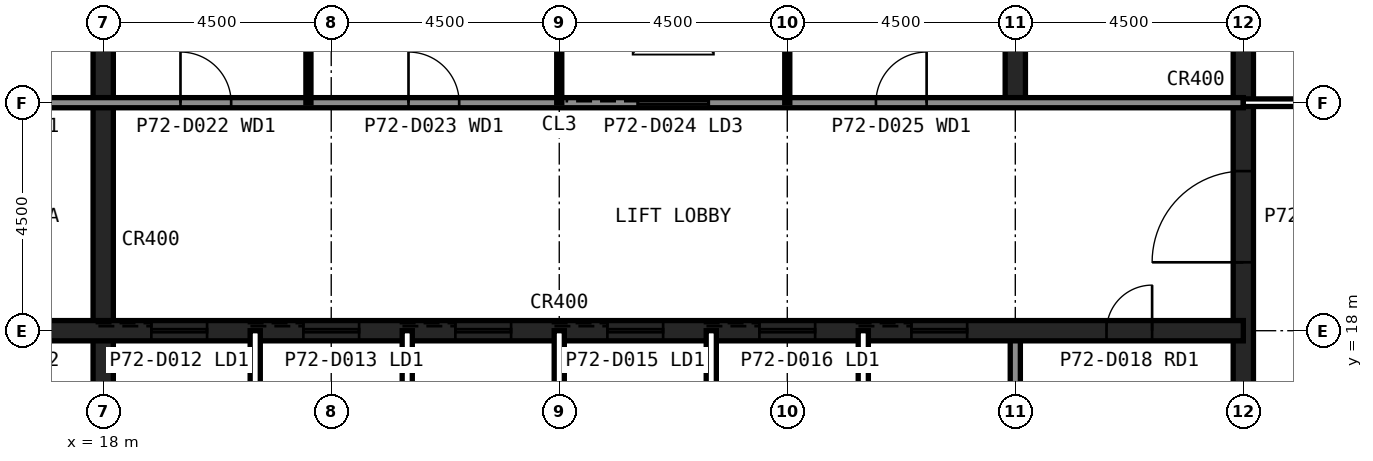
"""IFC4 building model, lengths in metres.
Left out: names, types, materials, properties, quantities, classifications, styles, units other than length and angle.
Written with IfcOpenShell. Run it as: python <this file> out.ifc"""

import sys

from ifc_helpers import new_model, si_unit, direction, frame, frame_2d, origin, place, context, subcontext, project, spatial, rectangle, extrude, element, fill, save


model = new_model("IFC4")
c1 = context("Model", 3, precision=1e-05, world=origin(), true_north=direction((0.0, 1.0)))
c2 = subcontext(c1, "Body", "Model", "MODEL_VIEW")
j1 = project(units=[si_unit("LENGTHUNIT", "METRE"), si_unit("PLANEANGLEUNIT", "RADIAN")], contexts=[c1])
p1 = place(None, origin())
s1 = spatial("IfcSite", under=j1, at=p1, CompositionType="ELEMENT")
p2 = place(p1, origin())
s2 = spatial("IfcBuilding", under=s1, at=p2, CompositionType="ELEMENT")
p3 = place(p2, frame((0.0, 0.0, 302.6)))
s3 = spatial("IfcBuildingStorey", under=s2, at=p3, CompositionType="ELEMENT", Elevation=302.6)
p4 = place(p3, frame((40.5, 13.5, 0.0), z_axis=(0.0, 0.0, 1.0), x_axis=(0.0, 1.0, 0.0)))
e1 = element("IfcWall", 1, at=p4, inside=s3, PredefinedType="SHEAR", context=c2, shape_type="SweptSolid", body=[
    extrude(rectangle(XDim=27.0, YDim=0.4, at=frame_2d((13.5, 0.0))), origin(), (0.0, 0.0, 1.0), 4.0),
])
p5 = place(p4, frame((5.85, 0.0, 0.0)))
e2 = element("IfcOpeningElement", 2, at=p5, cuts=e1, PredefinedType="OPENING", context=c2, shape_type="SweptSolid", body=[
    extrude(rectangle(XDim=1.8, YDim=2.1, at=frame_2d((0.9, 1.05))), frame((0.0, 0.21, 0.0), z_axis=(0.0, -1.0, 0.0), x_axis=(1.0, 0.0, 0.0)), (0.0, 0.0, 1.0), 0.42),
])
p6 = place(p4, frame((19.65, 0.0, 0.0)))
e3 = element("IfcOpeningElement", 3, at=p6, cuts=e1, PredefinedType="OPENING", context=c2, shape_type="SweptSolid", body=[
    extrude(rectangle(XDim=1.2, YDim=2.1, at=frame_2d((0.6, 1.05))), frame((0.0, 0.21, 0.0), z_axis=(0.0, -1.0, 0.0), x_axis=(1.0, 0.0, 0.0)), (0.0, 0.0, 1.0), 0.42),
])
p7 = place(p3, frame((18.0, 13.5, 0.0), z_axis=(0.0, 0.0, 1.0), x_axis=(0.0, 1.0, 0.0)))
e4 = element("IfcWall", 4, at=p7, inside=s3, PredefinedType="SHEAR", context=c2, shape_type="SweptSolid", body=[
    extrude(rectangle(XDim=18.0, YDim=0.4, at=frame_2d((9.0, 0.0))), origin(), (0.0, 0.0, 1.0), 4.0),
])
p8 = place(p3, frame((36.0, 13.5, 0.0), z_axis=(0.0, 0.0, 1.0), x_axis=(0.0, 1.0, 0.0)))
e5 = element("IfcWall", 5, at=p8, inside=s3, PredefinedType="SOLIDWALL", context=c2, shape_type="SweptSolid", body=[
    extrude(rectangle(XDim=4.5, YDim=0.2, at=frame_2d((2.25, 0.0))), origin(), (0.0, 0.0, 1.0), 3.84),
])
p9 = place(p3, frame((36.0, 22.5, 0.0), z_axis=(0.0, 0.0, 1.0), x_axis=(0.0, 1.0, 0.0)))
e6 = element("IfcWall", 6, at=p9, inside=s3, PredefinedType="SHEAR", context=c2, shape_type="SweptSolid", body=[
    extrude(rectangle(XDim=18.0, YDim=0.4, at=frame_2d((9.0, 0.0))), origin(), (0.0, 0.0, 1.0), 4.0),
])
p10 = place(p3, frame((13.5, 18.0, 0.0), z_axis=(0.0, 0.0, 1.0), x_axis=(1.0, 0.0, 0.0)))
e7 = element("IfcWall", 7, at=p10, inside=s3, PredefinedType="SHEAR", context=c2, shape_type="SweptSolid", body=[
    extrude(rectangle(XDim=27.0, YDim=0.4, at=frame_2d((13.5, 0.0))), origin(), (0.0, 0.0, 1.0), 4.0),
])
p11 = place(p10, frame((24.3, 0.0, 0.0)))
e8 = element("IfcOpeningElement", 8, at=p11, cuts=e7, PredefinedType="OPENING", context=c2, shape_type="SweptSolid", body=[
    extrude(rectangle(XDim=0.9, YDim=2.1, at=frame_2d((0.45, 1.05))), frame((0.0, 0.21, 0.0), z_axis=(0.0, -1.0, 0.0), x_axis=(1.0, 0.0, 0.0)), (0.0, 0.0, 1.0), 0.42),
])
p12 = place(p10, frame((5.45, 0.0, 0.0)))
e9 = element("IfcOpeningElement", 9, at=p12, cuts=e7, PredefinedType="OPENING", context=c2, shape_type="SweptSolid", body=[
    extrude(rectangle(XDim=1.1, YDim=2.1, at=frame_2d((0.55, 1.05))), frame((0.0, 0.21, 0.0), z_axis=(0.0, -1.0, 0.0), x_axis=(1.0, 0.0, 0.0)), (0.0, 0.0, 1.0), 0.42),
])
p13 = place(p10, frame((8.45, 0.0, 0.0)))
e10 = element("IfcOpeningElement", 10, at=p13, cuts=e7, PredefinedType="OPENING", context=c2, shape_type="SweptSolid", body=[
    extrude(rectangle(XDim=1.1, YDim=2.1, at=frame_2d((0.55, 1.05))), frame((0.0, 0.21, 0.0), z_axis=(0.0, -1.0, 0.0), x_axis=(1.0, 0.0, 0.0)), (0.0, 0.0, 1.0), 0.42),
])
p14 = place(p10, frame((11.45, 0.0, 0.0)))
e11 = element("IfcOpeningElement", 11, at=p14, cuts=e7, PredefinedType="OPENING", context=c2, shape_type="SweptSolid", body=[
    extrude(rectangle(XDim=1.1, YDim=2.1, at=frame_2d((0.55, 1.05))), frame((0.0, 0.21, 0.0), z_axis=(0.0, -1.0, 0.0), x_axis=(1.0, 0.0, 0.0)), (0.0, 0.0, 1.0), 0.42),
])
p15 = place(p10, frame((14.45, 0.0, 0.0)))
e12 = element("IfcOpeningElement", 12, at=p15, cuts=e7, PredefinedType="OPENING", context=c2, shape_type="SweptSolid", body=[
    extrude(rectangle(XDim=1.1, YDim=2.1, at=frame_2d((0.55, 1.05))), frame((0.0, 0.21, 0.0), z_axis=(0.0, -1.0, 0.0), x_axis=(1.0, 0.0, 0.0)), (0.0, 0.0, 1.0), 0.42),
])
p16 = place(p10, frame((17.45, 0.0, 0.0)))
e13 = element("IfcOpeningElement", 13, at=p16, cuts=e7, PredefinedType="OPENING", context=c2, shape_type="SweptSolid", body=[
    extrude(rectangle(XDim=1.1, YDim=2.1, at=frame_2d((0.55, 1.05))), frame((0.0, 0.21, 0.0), z_axis=(0.0, -1.0, 0.0), x_axis=(1.0, 0.0, 0.0)), (0.0, 0.0, 1.0), 0.42),
])
p17 = place(p10, frame((20.45, 0.0, 0.0)))
e14 = element("IfcOpeningElement", 14, at=p17, cuts=e7, PredefinedType="OPENING", context=c2, shape_type="SweptSolid", body=[
    extrude(rectangle(XDim=1.1, YDim=2.1, at=frame_2d((0.55, 1.05))), frame((0.0, 0.21, 0.0), z_axis=(0.0, -1.0, 0.0), x_axis=(1.0, 0.0, 0.0)), (0.0, 0.0, 1.0), 0.42),
])
p18 = place(p10, frame((1.6, 0.0, 0.0)))
e15 = element("IfcOpeningElement", 15, at=p18, cuts=e7, PredefinedType="OPENING", context=c2, shape_type="SweptSolid", body=[
    extrude(rectangle(XDim=1.3, YDim=2.2, at=frame_2d((0.65, 1.1))), frame((0.0, 0.21, 0.0), z_axis=(0.0, -1.0, 0.0), x_axis=(1.0, 0.0, 0.0)), (0.0, 0.0, 1.0), 0.42),
])
p19 = place(p3, frame((13.5, 22.5, 0.0), z_axis=(0.0, 0.0, 1.0), x_axis=(1.0, 0.0, 0.0)))
e16 = element("IfcWall", 16, at=p19, inside=s3, PredefinedType="SOLIDWALL", context=c2, shape_type="SweptSolid", body=[
    extrude(rectangle(XDim=27.0, YDim=0.2, at=frame_2d((13.5, 0.0))), origin(), (0.0, 0.0, 1.0), 3.84),
])
p20 = place(p19, frame((1.65, 0.0, 0.0)))
e17 = element("IfcOpeningElement", 17, at=p20, cuts=e16, PredefinedType="OPENING", context=c2, shape_type="SweptSolid", body=[
    extrude(rectangle(XDim=1.2, YDim=2.1, at=frame_2d((0.6, 1.05))), frame((0.0, 0.11, 0.0), z_axis=(0.0, -1.0, 0.0), x_axis=(1.0, 0.0, 0.0)), (0.0, 0.0, 1.0), 0.22),
])
p21 = place(p19, frame((6.025, 0.0, 0.0)))
e18 = element("IfcOpeningElement", 18, at=p21, cuts=e16, PredefinedType="OPENING", context=c2, shape_type="SweptSolid", body=[
    extrude(rectangle(XDim=1.0, YDim=2.1, at=frame_2d((0.5, 1.05))), frame((0.0, 0.11, 0.0), z_axis=(0.0, -1.0, 0.0), x_axis=(1.0, 0.0, 0.0)), (0.0, 0.0, 1.0), 0.22),
])
p22 = place(p19, frame((10.525, 0.0, 0.0)))
e19 = element("IfcOpeningElement", 19, at=p22, cuts=e16, PredefinedType="OPENING", context=c2, shape_type="SweptSolid", body=[
    extrude(rectangle(XDim=1.0, YDim=2.1, at=frame_2d((0.5, 1.05))), frame((0.0, 0.11, 0.0), z_axis=(0.0, -1.0, 0.0), x_axis=(1.0, 0.0, 0.0)), (0.0, 0.0, 1.0), 0.22),
])
p23 = place(p19, frame((19.75, 0.0, 0.0)))
e20 = element("IfcOpeningElement", 20, at=p23, cuts=e16, PredefinedType="OPENING", context=c2, shape_type="SweptSolid", body=[
    extrude(rectangle(XDim=1.0, YDim=2.1, at=frame_2d((0.5, 1.05))), frame((0.0, 0.11, 0.0), z_axis=(0.0, -1.0, 0.0), x_axis=(1.0, 0.0, 0.0)), (0.0, 0.0, 1.0), 0.22),
])
p24 = place(p19, frame((15.05, 0.0, 0.0)))
e21 = element("IfcOpeningElement", 21, at=p24, cuts=e16, PredefinedType="OPENING", context=c2, shape_type="SweptSolid", body=[
    extrude(rectangle(XDim=1.4, YDim=2.4, at=frame_2d((0.7, 1.2))), frame((0.0, 0.11, 0.0), z_axis=(0.0, -1.0, 0.0), x_axis=(1.0, 0.0, 0.0)), (0.0, 0.0, 1.0), 0.22),
])
for number, where, z_axis, x_axis in (
    (22, (21.0, 13.5, 0.0), (0.0, 0.0, 1.0), (0.0, 1.0, 0.0)),
    (23, (24.0, 13.5, 0.0), (0.0, 0.0, 1.0), (0.0, 1.0, 0.0)),
    (24, (27.0, 13.5, 0.0), (0.0, 0.0, 1.0), (0.0, 1.0, 0.0)),
    (25, (30.0, 13.5, 0.0), (0.0, 0.0, 1.0), (0.0, 1.0, 0.0)),
    (26, (33.0, 13.5, 0.0), (0.0, 0.0, 1.0), (0.0, 1.0, 0.0)),
):
    element("IfcWall", number, at=place(p3, frame(where, z_axis=z_axis, x_axis=x_axis)), inside=s3, PredefinedType="PARTITIONING", context=c2, shape_type="SweptSolid", body=[
        extrude(rectangle(XDim=4.5, YDim=0.2, at=frame_2d((2.25, 0.0))), origin(), (0.0, 0.0, 1.0), 3.84),
    ])
for number, where, z_axis, x_axis in (
    (27, (22.05, 22.5, 0.0), (0.0, 0.0, 1.0), (0.0, 1.0, 0.0)),
    (28, (27.0, 22.5, 0.0), (0.0, 0.0, 1.0), (0.0, 1.0, 0.0)),
    (29, (31.5, 22.5, 0.0), (0.0, 0.0, 1.0), (0.0, 1.0, 0.0)),
):
    element("IfcWall", number, at=place(p3, frame(where, z_axis=z_axis, x_axis=x_axis)), inside=s3, PredefinedType="PLUMBINGWALL", context=c2, shape_type="SweptSolid", body=[
        extrude(rectangle(XDim=9.0, YDim=0.1, at=frame_2d((4.5, 0.0))), origin(), (0.0, 0.0, 1.0), 3.84),
    ])
p25 = place(p3, frame((40.5, 22.5, 0.0), z_axis=(0.0, 0.0, 1.0), x_axis=(1.0, 0.0, 0.0)))
e30 = element("IfcWall", 30, at=p25, inside=s3, PredefinedType="PARTITIONING", context=c2, shape_type="SweptSolid", body=[
    extrude(rectangle(XDim=3.0, YDim=0.15, at=frame_2d((1.5, 0.0))), origin(), (0.0, 0.0, 1.0), 2.989),
])
p26 = place(p5, origin())
e31 = element("IfcDoor", 31, at=p26, inside=s3, OperationType="SINGLE_SWING_LEFT", PredefinedType="DOOR", context=c2, shape_type="SweptSolid", body=[
    extrude(rectangle(XDim=1.8, YDim=2.1, at=frame_2d((0.9, 1.05))), frame((0.0, 0.025, 0.0), z_axis=(0.0, -1.0, 0.0), x_axis=(1.0, 0.0, 0.0)), (0.0, 0.0, 1.0), 0.05),
])
fill(e2, e31)
p27 = place(p21, origin())
e32 = element("IfcDoor", 32, at=p27, inside=s3, OperationType="SINGLE_SWING_LEFT", PredefinedType="DOOR", context=c2, shape_type="SweptSolid", body=[
    extrude(rectangle(XDim=1.0, YDim=2.1, at=frame_2d((0.5, 1.05))), frame((0.0, 0.025, 0.0), z_axis=(0.0, -1.0, 0.0), x_axis=(1.0, 0.0, 0.0)), (0.0, 0.0, 1.0), 0.05),
])
fill(e18, e32)
p28 = place(p22, origin())
e33 = element("IfcDoor", 33, at=p28, inside=s3, OperationType="SINGLE_SWING_LEFT", PredefinedType="DOOR", context=c2, shape_type="SweptSolid", body=[
    extrude(rectangle(XDim=1.0, YDim=2.1, at=frame_2d((0.5, 1.05))), frame((0.0, 0.025, 0.0), z_axis=(0.0, -1.0, 0.0), x_axis=(1.0, 0.0, 0.0)), (0.0, 0.0, 1.0), 0.05),
])
fill(e19, e33)
p29 = place(p23, origin())
e34 = element("IfcDoor", 34, at=p29, inside=s3, OperationType="SINGLE_SWING_RIGHT", PredefinedType="DOOR", context=c2, shape_type="SweptSolid", body=[
    extrude(rectangle(XDim=1.0, YDim=2.1, at=frame_2d((0.5, 1.05))), frame((0.0, 0.025, 0.0), z_axis=(0.0, -1.0, 0.0), x_axis=(1.0, 0.0, 0.0)), (0.0, 0.0, 1.0), 0.05),
])
fill(e20, e34)
p30 = place(p11, origin())
e35 = element("IfcDoor", 35, at=p30, inside=s3, OperationType="SINGLE_SWING_RIGHT", PredefinedType="DOOR", context=c2, shape_type="SweptSolid", body=[
    extrude(rectangle(XDim=0.9, YDim=2.1, at=frame_2d((0.45, 1.05))), frame((0.0, 0.025, 0.0), z_axis=(0.0, -1.0, 0.0), x_axis=(1.0, 0.0, 0.0)), (0.0, 0.0, 1.0), 0.05),
])
fill(e8, e35)
p31 = place(p12, origin())
e36 = element("IfcDoor", 36, at=p31, inside=s3, OperationType="SLIDING_TO_LEFT", PredefinedType="DOOR", context=c2, shape_type="SweptSolid", body=[
    extrude(rectangle(XDim=1.1, YDim=2.1, at=frame_2d((0.55, 1.05))), frame((0.0, 0.025, 0.0), z_axis=(0.0, -1.0, 0.0), x_axis=(1.0, 0.0, 0.0)), (0.0, 0.0, 1.0), 0.05),
])
fill(e9, e36)
p32 = place(p13, origin())
e37 = element("IfcDoor", 37, at=p32, inside=s3, OperationType="SLIDING_TO_LEFT", PredefinedType="DOOR", context=c2, shape_type="SweptSolid", body=[
    extrude(rectangle(XDim=1.1, YDim=2.1, at=frame_2d((0.55, 1.05))), frame((0.0, 0.025, 0.0), z_axis=(0.0, -1.0, 0.0), x_axis=(1.0, 0.0, 0.0)), (0.0, 0.0, 1.0), 0.05),
])
fill(e10, e37)
p33 = place(p14, origin())
e38 = element("IfcDoor", 38, at=p33, inside=s3, OperationType="SLIDING_TO_LEFT", PredefinedType="DOOR", context=c2, shape_type="SweptSolid", body=[
    extrude(rectangle(XDim=1.1, YDim=2.1, at=frame_2d((0.55, 1.05))), frame((0.0, 0.025, 0.0), z_axis=(0.0, -1.0, 0.0), x_axis=(1.0, 0.0, 0.0)), (0.0, 0.0, 1.0), 0.05),
])
fill(e11, e38)
p34 = place(p15, origin())
e39 = element("IfcDoor", 39, at=p34, inside=s3, OperationType="SLIDING_TO_LEFT", PredefinedType="DOOR", context=c2, shape_type="SweptSolid", body=[
    extrude(rectangle(XDim=1.1, YDim=2.1, at=frame_2d((0.55, 1.05))), frame((0.0, 0.025, 0.0), z_axis=(0.0, -1.0, 0.0), x_axis=(1.0, 0.0, 0.0)), (0.0, 0.0, 1.0), 0.05),
])
fill(e12, e39)
p35 = place(p16, origin())
e40 = element("IfcDoor", 40, at=p35, inside=s3, OperationType="SLIDING_TO_LEFT", PredefinedType="DOOR", context=c2, shape_type="SweptSolid", body=[
    extrude(rectangle(XDim=1.1, YDim=2.1, at=frame_2d((0.55, 1.05))), frame((0.0, 0.025, 0.0), z_axis=(0.0, -1.0, 0.0), x_axis=(1.0, 0.0, 0.0)), (0.0, 0.0, 1.0), 0.05),
])
fill(e13, e40)
p36 = place(p17, origin())
e41 = element("IfcDoor", 41, at=p36, inside=s3, OperationType="SLIDING_TO_LEFT", PredefinedType="DOOR", context=c2, shape_type="SweptSolid", body=[
    extrude(rectangle(XDim=1.1, YDim=2.1, at=frame_2d((0.55, 1.05))), frame((0.0, 0.025, 0.0), z_axis=(0.0, -1.0, 0.0), x_axis=(1.0, 0.0, 0.0)), (0.0, 0.0, 1.0), 0.05),
])
fill(e14, e41)
p37 = place(p24, origin())
e42 = element("IfcDoor", 42, at=p37, inside=s3, OperationType="SLIDING_TO_LEFT", PredefinedType="DOOR", context=c2, shape_type="SweptSolid", body=[
    extrude(rectangle(XDim=1.4, YDim=2.4, at=frame_2d((0.7, 1.2))), frame((0.0, 0.025, 0.0), z_axis=(0.0, -1.0, 0.0), x_axis=(1.0, 0.0, 0.0)), (0.0, 0.0, 1.0), 0.05),
])
fill(e21, e42)
save(model, sys.argv[1])
